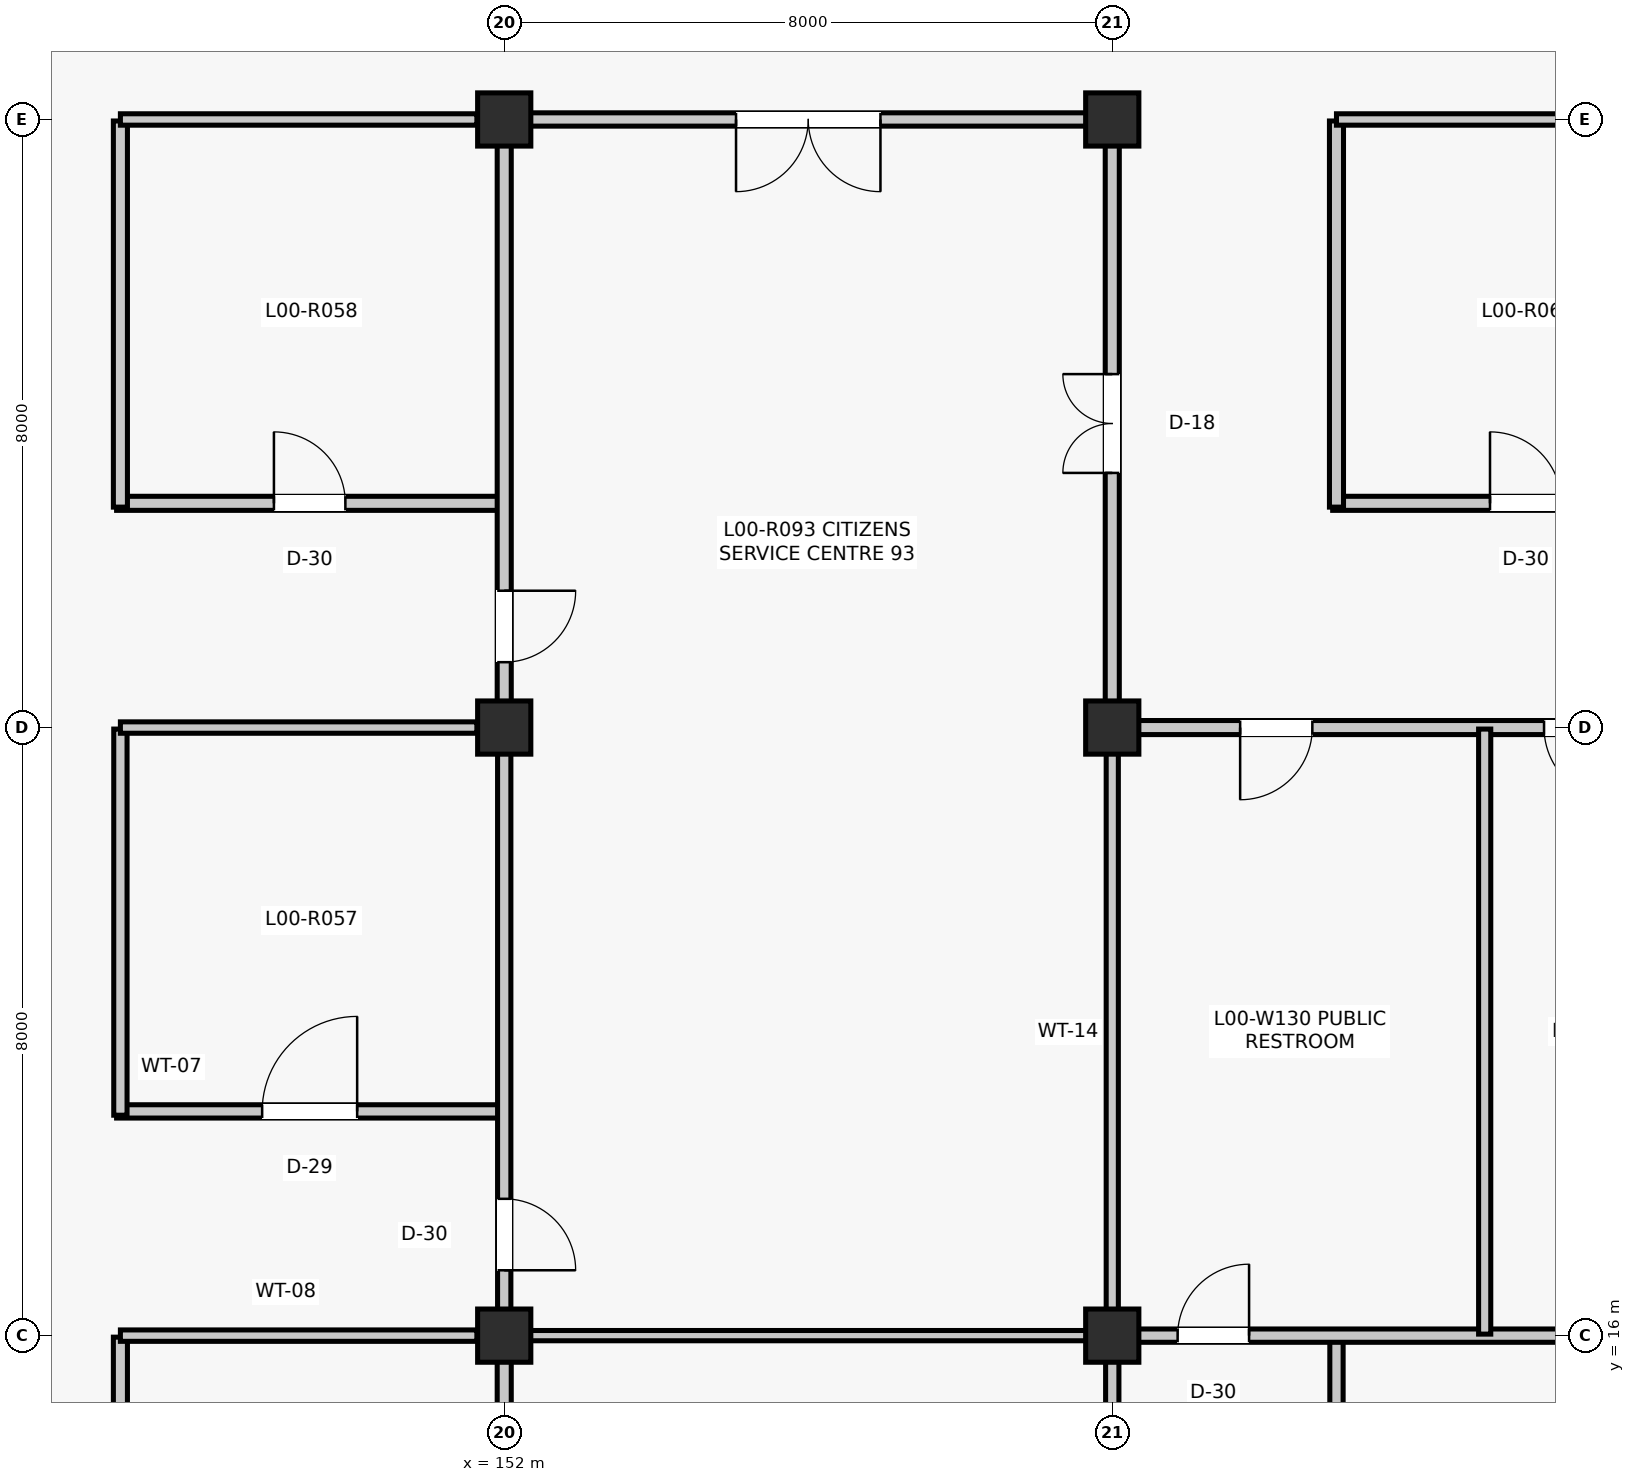
"""IFC4 building model, lengths in metres.
Left out: names, types, materials, properties, quantities, classifications, styles, units other than length and angle.
Written with IfcOpenShell. Run it as: python <this file> out.ifc"""

import sys

from ifc_helpers import new_model, si_unit, direction, frame, frame_2d, origin, origin_2d, place, context, subcontext, project, spatial, rectangle, extrude, element, fill, save


model = new_model("IFC4")
c1 = context("Model", 3, precision=1e-05, world=origin(), true_north=direction((0.0, 1.0)))
c2 = subcontext(c1, "Body", "Model", "MODEL_VIEW")
j1 = project(units=[si_unit("LENGTHUNIT", "METRE"), si_unit("PLANEANGLEUNIT", "RADIAN")], contexts=[c1])
p1 = place(None, origin())
s1 = spatial("IfcSite", under=j1, at=p1, CompositionType="ELEMENT")
p2 = place(p1, origin())
s2 = spatial("IfcBuilding", under=s1, at=p2, CompositionType="ELEMENT")
p3 = place(p2, origin())
s3 = spatial("IfcBuildingStorey", under=s2, at=p3, CompositionType="ELEMENT", Elevation=0.0)
for number, where, z_axis, x_axis in (
    (1, (152.0, 16.0, 0.0), (0.0, 0.0, 1.0), (1.0, 0.0, 0.0)),
    (2, (152.0, 24.0, 0.0), (0.0, 0.0, 1.0), (1.0, 0.0, 0.0)),
    (3, (152.0, 32.0, 0.0), (0.0, 0.0, 1.0), (1.0, 0.0, 0.0)),
    (4, (160.0, 16.0, 0.0), (0.0, 0.0, 1.0), (1.0, 0.0, 0.0)),
    (5, (160.0, 24.0, 0.0), (0.0, 0.0, 1.0), (1.0, 0.0, 0.0)),
    (6, (160.0, 32.0, 0.0), (0.0, 0.0, 1.0), (1.0, 0.0, 0.0)),
):
    element("IfcColumn", number, at=place(p3, frame(where, z_axis=z_axis, x_axis=x_axis)), inside=s3, PredefinedType="COLUMN", context=c2, shape_type="SweptSolid", body=[
        extrude(rectangle(XDim=0.7, YDim=0.7, at=origin_2d()), origin(), (0.0, 0.0, 1.0), 5.28),
    ])
p4 = place(p3, frame((146.95, 10.9, 0.0), z_axis=(0.0, 0.0, 1.0), x_axis=(0.0, 1.0, 0.0)))
e7 = element("IfcWall", 7, at=p4, inside=s3, PredefinedType="PARTITIONING", context=c2, shape_type="SweptSolid", body=[
    extrude(rectangle(XDim=5.08, YDim=0.185, at=frame_2d((2.54, 0.0))), origin(), (0.0, 0.0, 1.0), 4.603),
])
p5 = place(p3, frame((146.95, 16.0, 0.0), z_axis=(0.0, 0.0, 1.0), x_axis=(1.0, 0.0, 0.0)))
e8 = element("IfcWall", 8, at=p5, inside=s3, PredefinedType="PARTITIONING", context=c2, shape_type="SweptSolid", body=[
    extrude(rectangle(XDim=4.69, YDim=0.15, at=frame_2d((2.345, 0.0))), origin(), (0.0, 0.0, 1.0), 4.603),
])
p6 = place(p3, frame((146.9, 18.95, 0.0), z_axis=(0.0, 0.0, 1.0), x_axis=(1.0, 0.0, 0.0)))
e9 = element("IfcWall", 9, at=p6, inside=s3, PredefinedType="PARTITIONING", context=c2, shape_type="SweptSolid", body=[
    extrude(rectangle(XDim=5.08, YDim=0.175, at=frame_2d((2.54, 0.0))), origin(), (0.0, 0.0, 1.0), 5.025),
])
p7 = place(p6, frame((1.915, 0.0, 0.0)))
e10 = element("IfcOpeningElement", 10, at=p7, cuts=e9, PredefinedType="OPENING", context=c2, shape_type="SweptSolid", body=[
    extrude(rectangle(XDim=1.25, YDim=2.18, at=frame_2d((0.625, 1.09))), frame((0.0, 0.097, 0.0), z_axis=(0.0, -1.0, 0.0), x_axis=(1.0, 0.0, 0.0)), (0.0, 0.0, 1.0), 0.195),
])
p8 = place(p3, frame((146.95, 18.9, 0.0), z_axis=(0.0, 0.0, 1.0), x_axis=(0.0, 1.0, 0.0)))
e11 = element("IfcWall", 11, at=p8, inside=s3, PredefinedType="PARTITIONING", context=c2, shape_type="SweptSolid", body=[
    extrude(rectangle(XDim=5.08, YDim=0.175, at=frame_2d((2.54, 0.0))), origin(), (0.0, 0.0, 1.0), 5.025),
])
p9 = place(p3, frame((146.95, 24.0, 0.0), z_axis=(0.0, 0.0, 1.0), x_axis=(1.0, 0.0, 0.0)))
e12 = element("IfcWall", 12, at=p9, inside=s3, PredefinedType="PARTITIONING", context=c2, shape_type="SweptSolid", body=[
    extrude(rectangle(XDim=4.69, YDim=0.15, at=frame_2d((2.345, 0.0))), origin(), (0.0, 0.0, 1.0), 5.025),
])
p10 = place(p3, frame((146.9, 26.95, 0.0), z_axis=(0.0, 0.0, 1.0), x_axis=(1.0, 0.0, 0.0)))
e13 = element("IfcWall", 13, at=p10, inside=s3, PredefinedType="PARTITIONING", context=c2, shape_type="SweptSolid", body=[
    extrude(rectangle(XDim=5.08, YDim=0.185, at=frame_2d((2.54, 0.0))), origin(), (0.0, 0.0, 1.0), 5.025),
])
p11 = place(p10, frame((2.07, 0.0, 0.0)))
e14 = element("IfcOpeningElement", 14, at=p11, cuts=e13, PredefinedType="OPENING", context=c2, shape_type="SweptSolid", body=[
    extrude(rectangle(XDim=0.94, YDim=2.12, at=frame_2d((0.47, 1.06))), frame((0.0, 0.103, 0.0), z_axis=(0.0, -1.0, 0.0), x_axis=(1.0, 0.0, 0.0)), (0.0, 0.0, 1.0), 0.205),
])
p12 = place(p3, frame((146.95, 26.9, 0.0), z_axis=(0.0, 0.0, 1.0), x_axis=(0.0, 1.0, 0.0)))
e15 = element("IfcWall", 15, at=p12, inside=s3, PredefinedType="PARTITIONING", context=c2, shape_type="SweptSolid", body=[
    extrude(rectangle(XDim=5.08, YDim=0.185, at=frame_2d((2.54, 0.0))), origin(), (0.0, 0.0, 1.0), 4.607),
])
p13 = place(p3, frame((146.95, 32.0, 0.0), z_axis=(0.0, 0.0, 1.0), x_axis=(1.0, 0.0, 0.0)))
e16 = element("IfcWall", 16, at=p13, inside=s3, PredefinedType="PARTITIONING", context=c2, shape_type="SweptSolid", body=[
    extrude(rectangle(XDim=4.69, YDim=0.15, at=frame_2d((2.345, 0.0))), origin(), (0.0, 0.0, 1.0), 4.607),
])
p14 = place(p3, frame((162.95, 10.9, 0.0), z_axis=(0.0, 0.0, 1.0), x_axis=(0.0, 1.0, 0.0)))
e17 = element("IfcWall", 17, at=p14, inside=s3, PredefinedType="PARTITIONING", context=c2, shape_type="SweptSolid", body=[
    extrude(rectangle(XDim=5.08, YDim=0.175, at=frame_2d((2.54, 0.0))), origin(), (0.0, 0.0, 1.0), 4.336),
])
p15 = place(p3, frame((162.9, 26.95, 0.0), z_axis=(0.0, 0.0, 1.0), x_axis=(1.0, 0.0, 0.0)))
e18 = element("IfcWall", 18, at=p15, inside=s3, PredefinedType="PARTITIONING", context=c2, shape_type="SweptSolid", body=[
    extrude(rectangle(XDim=5.08, YDim=0.185, at=frame_2d((2.54, 0.0))), origin(), (0.0, 0.0, 1.0), 4.403),
])
p16 = place(p15, frame((2.07, 0.0, 0.0)))
e19 = element("IfcOpeningElement", 19, at=p16, cuts=e18, PredefinedType="OPENING", context=c2, shape_type="SweptSolid", body=[
    extrude(rectangle(XDim=0.94, YDim=2.12, at=frame_2d((0.47, 1.06))), frame((0.0, 0.103, 0.0), z_axis=(0.0, -1.0, 0.0), x_axis=(1.0, 0.0, 0.0)), (0.0, 0.0, 1.0), 0.205),
])
p17 = place(p3, frame((162.95, 26.9, 0.0), z_axis=(0.0, 0.0, 1.0), x_axis=(0.0, 1.0, 0.0)))
e20 = element("IfcWall", 20, at=p17, inside=s3, PredefinedType="PARTITIONING", context=c2, shape_type="SweptSolid", body=[
    extrude(rectangle(XDim=5.08, YDim=0.185, at=frame_2d((2.54, 0.0))), origin(), (0.0, 0.0, 1.0), 4.327),
])
p18 = place(p3, frame((162.95, 32.0, 0.0), z_axis=(0.0, 0.0, 1.0), x_axis=(1.0, 0.0, 0.0)))
e21 = element("IfcWall", 21, at=p18, inside=s3, PredefinedType="PARTITIONING", context=c2, shape_type="SweptSolid", body=[
    extrude(rectangle(XDim=4.69, YDim=0.15, at=frame_2d((2.345, 0.0))), origin(), (0.0, 0.0, 1.0), 4.327),
])
p19 = place(p3, frame((152.0, 8.34, 0.0), z_axis=(0.0, 0.0, 1.0), x_axis=(0.0, 1.0, 0.0)))
e22 = element("IfcWall", 22, at=p19, inside=s3, PredefinedType="PARTITIONING", context=c2, shape_type="SweptSolid", body=[
    extrude(rectangle(XDim=7.32, YDim=0.185, at=frame_2d((3.66, 0.0))), origin(), (0.0, 0.0, 1.0), 4.403),
])
p20 = place(p19, frame((0.52, 0.0, 0.0)))
e23 = element("IfcOpeningElement", 23, at=p20, cuts=e22, PredefinedType="OPENING", context=c2, shape_type="SweptSolid", body=[
    extrude(rectangle(XDim=0.94, YDim=2.12, at=frame_2d((0.47, 1.06))), frame((0.0, 0.103, 0.0), z_axis=(0.0, -1.0, 0.0), x_axis=(1.0, 0.0, 0.0)), (0.0, 0.0, 1.0), 0.205),
])
p21 = place(p3, frame((152.0, 16.34, 0.0), z_axis=(0.0, 0.0, 1.0), x_axis=(0.0, 1.0, 0.0)))
e24 = element("IfcWall", 24, at=p21, inside=s3, PredefinedType="PARTITIONING", context=c2, shape_type="SweptSolid", body=[
    extrude(rectangle(XDim=7.32, YDim=0.175, at=frame_2d((3.66, 0.0))), origin(), (0.0, 0.0, 1.0), 5.025),
])
p22 = place(p21, frame((0.52, 0.0, 0.0)))
e25 = element("IfcOpeningElement", 25, at=p22, cuts=e24, PredefinedType="OPENING", context=c2, shape_type="SweptSolid", body=[
    extrude(rectangle(XDim=0.94, YDim=2.12, at=frame_2d((0.47, 1.06))), frame((0.0, 0.097, 0.0), z_axis=(0.0, -1.0, 0.0), x_axis=(1.0, 0.0, 0.0)), (0.0, 0.0, 1.0), 0.195),
])
p23 = place(p3, frame((152.0, 24.34, 0.0), z_axis=(0.0, 0.0, 1.0), x_axis=(0.0, 1.0, 0.0)))
e26 = element("IfcWall", 26, at=p23, inside=s3, PredefinedType="PARTITIONING", context=c2, shape_type="SweptSolid", body=[
    extrude(rectangle(XDim=7.32, YDim=0.185, at=frame_2d((3.66, 0.0))), origin(), (0.0, 0.0, 1.0), 5.025),
])
p24 = place(p23, frame((0.52, 0.0, 0.0)))
e27 = element("IfcOpeningElement", 27, at=p24, cuts=e26, PredefinedType="OPENING", context=c2, shape_type="SweptSolid", body=[
    extrude(rectangle(XDim=0.94, YDim=2.12, at=frame_2d((0.47, 1.06))), frame((0.0, 0.103, 0.0), z_axis=(0.0, -1.0, 0.0), x_axis=(1.0, 0.0, 0.0)), (0.0, 0.0, 1.0), 0.205),
])
p25 = place(p3, frame((160.0, 8.34, 0.0), z_axis=(0.0, 0.0, 1.0), x_axis=(0.0, 1.0, 0.0)))
e28 = element("IfcWall", 28, at=p25, inside=s3, PredefinedType="PARTITIONING", context=c2, shape_type="SweptSolid", body=[
    extrude(rectangle(XDim=7.32, YDim=0.175, at=frame_2d((3.66, 0.0))), origin(), (0.0, 0.0, 1.0), 4.412),
])
p26 = place(p3, frame((152.34, 16.0, 0.0), z_axis=(0.0, 0.0, 1.0), x_axis=(1.0, 0.0, 0.0)))
e29 = element("IfcWall", 29, at=p26, inside=s3, PredefinedType="PARTITIONING", context=c2, shape_type="SweptSolid", body=[
    extrude(rectangle(XDim=7.32, YDim=0.135, at=frame_2d((3.66, 0.0))), origin(), (0.0, 0.0, 1.0), 4.667),
])
p27 = place(p3, frame((160.0, 16.34, 0.0), z_axis=(0.0, 0.0, 1.0), x_axis=(0.0, 1.0, 0.0)))
e30 = element("IfcWall", 30, at=p27, inside=s3, PredefinedType="PARTITIONING", context=c2, shape_type="SweptSolid", body=[
    extrude(rectangle(XDim=7.32, YDim=0.16, at=frame_2d((3.66, 0.0))), origin(), (0.0, 0.0, 1.0), 4.607),
])
p28 = place(p3, frame((160.0, 24.34, 0.0), z_axis=(0.0, 0.0, 1.0), x_axis=(0.0, 1.0, 0.0)))
e31 = element("IfcWall", 31, at=p28, inside=s3, PredefinedType="PARTITIONING", context=c2, shape_type="SweptSolid", body=[
    extrude(rectangle(XDim=7.32, YDim=0.185, at=frame_2d((3.66, 0.0))), origin(), (0.0, 0.0, 1.0), 4.67),
])
p29 = place(p28, frame((3.01, 0.0, 0.0)))
e32 = element("IfcOpeningElement", 32, at=p29, cuts=e31, PredefinedType="OPENING", context=c2, shape_type="SweptSolid", body=[
    extrude(rectangle(XDim=1.3, YDim=2.2, at=frame_2d((0.65, 1.1))), frame((0.0, 0.103, 0.0), z_axis=(0.0, -1.0, 0.0), x_axis=(1.0, 0.0, 0.0)), (0.0, 0.0, 1.0), 0.205),
])
p30 = place(p3, frame((152.34, 32.0, 0.0), z_axis=(0.0, 0.0, 1.0), x_axis=(1.0, 0.0, 0.0)))
e33 = element("IfcWall", 33, at=p30, inside=s3, PredefinedType="PARTITIONING", context=c2, shape_type="SweptSolid", body=[
    extrude(rectangle(XDim=7.32, YDim=0.175, at=frame_2d((3.66, 0.0))), origin(), (0.0, 0.0, 1.0), 4.67),
])
p31 = place(p30, frame((2.71, 0.0, 0.0)))
e34 = element("IfcOpeningElement", 34, at=p31, cuts=e33, PredefinedType="OPENING", context=c2, shape_type="SweptSolid", body=[
    extrude(rectangle(XDim=1.9, YDim=2.38, at=frame_2d((0.95, 1.19))), frame((0.0, 0.097, 0.0), z_axis=(0.0, -1.0, 0.0), x_axis=(1.0, 0.0, 0.0)), (0.0, 0.0, 1.0), 0.195),
])
p32 = place(p3, frame((160.34, 16.0, 0.0), z_axis=(0.0, 0.0, 1.0), x_axis=(1.0, 0.0, 0.0)))
e35 = element("IfcWall", 35, at=p32, inside=s3, PredefinedType="PARTITIONING", context=c2, shape_type="SweptSolid", body=[
    extrude(rectangle(XDim=7.27, YDim=0.175, at=frame_2d((3.635, 0.0))), origin(), (0.0, 0.0, 1.0), 4.336),
])
p33 = place(p32, frame((0.52, 0.0, 0.0)))
e36 = element("IfcOpeningElement", 36, at=p33, cuts=e35, PredefinedType="OPENING", context=c2, shape_type="SweptSolid", body=[
    extrude(rectangle(XDim=0.94, YDim=2.12, at=frame_2d((0.47, 1.06))), frame((0.0, 0.097, 0.0), z_axis=(0.0, -1.0, 0.0), x_axis=(1.0, 0.0, 0.0)), (0.0, 0.0, 1.0), 0.195),
])
p34 = place(p3, frame((160.34, 24.0, 0.0), z_axis=(0.0, 0.0, 1.0), x_axis=(1.0, 0.0, 0.0)))
e37 = element("IfcWall", 37, at=p34, inside=s3, PredefinedType="PARTITIONING", context=c2, shape_type="SweptSolid", body=[
    extrude(rectangle(XDim=7.27, YDim=0.185, at=frame_2d((3.635, 0.0))), origin(), (0.0, 0.0, 1.0), 4.404),
])
p35 = place(p34, frame((1.343, 0.0, 0.0)))
e38 = element("IfcOpeningElement", 38, at=p35, cuts=e37, PredefinedType="OPENING", context=c2, shape_type="SweptSolid", body=[
    extrude(rectangle(XDim=0.95, YDim=2.1, at=frame_2d((0.475, 1.05))), frame((0.0, 0.103, 0.0), z_axis=(0.0, -1.0, 0.0), x_axis=(1.0, 0.0, 0.0)), (0.0, 0.0, 1.0), 0.205),
])
p36 = place(p34, frame((5.341, 0.0, 0.0)))
e39 = element("IfcOpeningElement", 39, at=p36, cuts=e37, PredefinedType="OPENING", context=c2, shape_type="SweptSolid", body=[
    extrude(rectangle(XDim=0.95, YDim=2.1, at=frame_2d((0.475, 1.05))), frame((0.0, 0.103, 0.0), z_axis=(0.0, -1.0, 0.0), x_axis=(1.0, 0.0, 0.0)), (0.0, 0.0, 1.0), 0.205),
])
p37 = place(p3, frame((164.9, 16.02, 0.0), z_axis=(0.0, 0.0, 1.0), x_axis=(0.0, 1.0, 0.0)))
e40 = element("IfcWall", 40, at=p37, inside=s3, PredefinedType="PARTITIONING", context=c2, shape_type="SweptSolid", body=[
    extrude(rectangle(XDim=7.96, YDim=0.16, at=frame_2d((3.98, 0.0))), origin(), (0.0, 0.0, 1.0), 4.336),
])
p38 = place(p7, origin())
e41 = element("IfcDoor", 41, at=p38, inside=s3, OperationType="SINGLE_SWING_RIGHT", PredefinedType="DOOR", context=c2, shape_type="SweptSolid", body=[
    extrude(rectangle(XDim=1.25, YDim=2.18, at=frame_2d((0.625, 1.09))), frame((0.0, 0.025, 0.0), z_axis=(0.0, -1.0, 0.0), x_axis=(1.0, 0.0, 0.0)), (0.0, 0.0, 1.0), 0.05),
])
fill(e10, e41)
p39 = place(p11, origin())
e42 = element("IfcDoor", 42, at=p39, inside=s3, OperationType="SINGLE_SWING_LEFT", PredefinedType="DOOR", context=c2, shape_type="SweptSolid", body=[
    extrude(rectangle(XDim=0.94, YDim=2.12, at=frame_2d((0.47, 1.06))), frame((0.0, 0.025, 0.0), z_axis=(0.0, -1.0, 0.0), x_axis=(1.0, 0.0, 0.0)), (0.0, 0.0, 1.0), 0.05),
])
fill(e14, e42)
p40 = place(p16, origin())
e43 = element("IfcDoor", 43, at=p40, inside=s3, OperationType="SINGLE_SWING_LEFT", PredefinedType="DOOR", context=c2, shape_type="SweptSolid", body=[
    extrude(rectangle(XDim=0.94, YDim=2.12, at=frame_2d((0.47, 1.06))), frame((0.0, 0.025, 0.0), z_axis=(0.0, -1.0, 0.0), x_axis=(1.0, 0.0, 0.0)), (0.0, 0.0, 1.0), 0.05),
])
fill(e19, e43)
p41 = place(p22, frame((0.94, 0.0, 0.0), z_axis=(0.0, 0.0, 1.0), x_axis=(-1.0, 0.0, 0.0)))
e44 = element("IfcDoor", 44, at=p41, inside=s3, OperationType="SINGLE_SWING_LEFT", PredefinedType="DOOR", context=c2, shape_type="SweptSolid", body=[
    extrude(rectangle(XDim=0.94, YDim=2.12, at=frame_2d((0.47, 1.06))), frame((0.0, 0.025, 0.0), z_axis=(0.0, -1.0, 0.0), x_axis=(1.0, 0.0, 0.0)), (0.0, 0.0, 1.0), 0.05),
])
fill(e25, e44)
p42 = place(p24, frame((0.94, 0.0, 0.0), z_axis=(0.0, 0.0, 1.0), x_axis=(-1.0, 0.0, 0.0)))
e45 = element("IfcDoor", 45, at=p42, inside=s3, OperationType="SINGLE_SWING_RIGHT", PredefinedType="DOOR", context=c2, shape_type="SweptSolid", body=[
    extrude(rectangle(XDim=0.94, YDim=2.12, at=frame_2d((0.47, 1.06))), frame((0.0, 0.025, 0.0), z_axis=(0.0, -1.0, 0.0), x_axis=(1.0, 0.0, 0.0)), (0.0, 0.0, 1.0), 0.05),
])
fill(e27, e45)
p43 = place(p29, origin())
e46 = element("IfcDoor", 46, at=p43, inside=s3, OperationType="DOUBLE_DOOR_SINGLE_SWING", PredefinedType="DOOR", context=c2, shape_type="SweptSolid", body=[
    extrude(rectangle(XDim=1.3, YDim=2.2, at=frame_2d((0.65, 1.1))), frame((0.0, 0.025, 0.0), z_axis=(0.0, -1.0, 0.0), x_axis=(1.0, 0.0, 0.0)), (0.0, 0.0, 1.0), 0.05),
])
fill(e32, e46)
p44 = place(p31, frame((1.9, 0.0, 0.0), z_axis=(0.0, 0.0, 1.0), x_axis=(-1.0, 0.0, 0.0)))
e47 = element("IfcDoor", 47, at=p44, inside=s3, OperationType="DOUBLE_DOOR_SINGLE_SWING", PredefinedType="DOOR", context=c2, shape_type="SweptSolid", body=[
    extrude(rectangle(XDim=1.9, YDim=2.38, at=frame_2d((0.95, 1.19))), frame((0.0, 0.025, 0.0), z_axis=(0.0, -1.0, 0.0), x_axis=(1.0, 0.0, 0.0)), (0.0, 0.0, 1.0), 0.05),
])
fill(e34, e47)
p45 = place(p33, origin())
e48 = element("IfcDoor", 48, at=p45, inside=s3, OperationType="SINGLE_SWING_RIGHT", PredefinedType="DOOR", context=c2, shape_type="SweptSolid", body=[
    extrude(rectangle(XDim=0.94, YDim=2.12, at=frame_2d((0.47, 1.06))), frame((0.0, 0.025, 0.0), z_axis=(0.0, -1.0, 0.0), x_axis=(1.0, 0.0, 0.0)), (0.0, 0.0, 1.0), 0.05),
])
fill(e36, e48)
p46 = place(p35, frame((0.95, 0.0, 0.0), z_axis=(0.0, 0.0, 1.0), x_axis=(-1.0, 0.0, 0.0)))
e49 = element("IfcDoor", 49, at=p46, inside=s3, OperationType="SINGLE_SWING_LEFT", PredefinedType="DOOR", context=c2, shape_type="SweptSolid", body=[
    extrude(rectangle(XDim=0.95, YDim=2.1, at=frame_2d((0.475, 1.05))), frame((0.0, 0.025, 0.0), z_axis=(0.0, -1.0, 0.0), x_axis=(1.0, 0.0, 0.0)), (0.0, 0.0, 1.0), 0.05),
])
fill(e38, e49)
p47 = place(p36, frame((0.95, 0.0, 0.0), z_axis=(0.0, 0.0, 1.0), x_axis=(-1.0, 0.0, 0.0)))
e50 = element("IfcDoor", 50, at=p47, inside=s3, OperationType="SINGLE_SWING_RIGHT", PredefinedType="DOOR", context=c2, shape_type="SweptSolid", body=[
    extrude(rectangle(XDim=0.95, YDim=2.1, at=frame_2d((0.475, 1.05))), frame((0.0, 0.025, 0.0), z_axis=(0.0, -1.0, 0.0), x_axis=(1.0, 0.0, 0.0)), (0.0, 0.0, 1.0), 0.05),
])
fill(e39, e50)
save(model, sys.argv[1])
